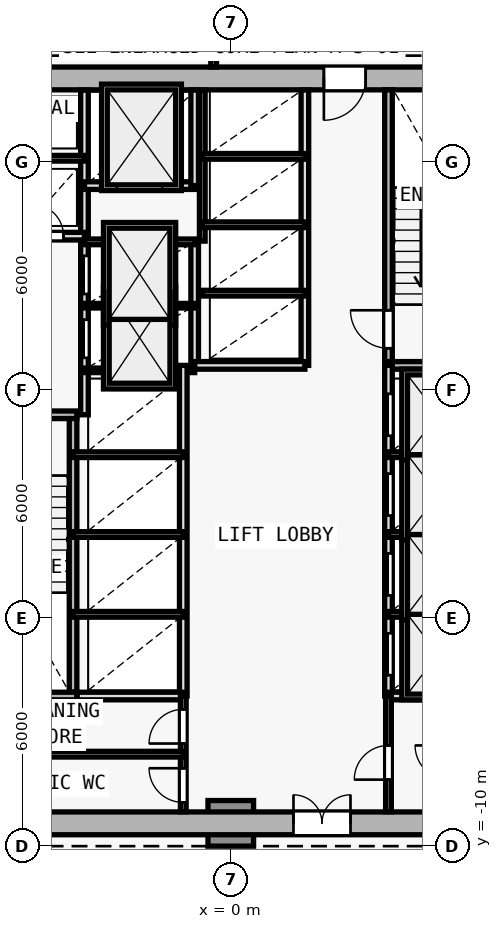
"""IFC4 building model, lengths in metres.
Left out: names, types, materials, properties, quantities, classifications, styles, units other than length and angle.
Written with IfcOpenShell. Run it as: python <this file> out.ifc"""

import sys

from ifc_helpers import new_model, si_unit, direction, frame, frame_2d, origin, origin_2d, place, context, subcontext, project, spatial, rectangle, extrude, element, fill, save


model = new_model("IFC4")
c1 = context("Model", 3, precision=1e-05, world=origin(), true_north=direction((0.0, 1.0)))
c2 = subcontext(c1, "Body", "Model", "MODEL_VIEW")
j1 = project(units=[si_unit("LENGTHUNIT", "METRE"), si_unit("PLANEANGLEUNIT", "RADIAN")], contexts=[c1])
p1 = place(None, origin())
s1 = spatial("IfcSite", under=j1, at=p1, CompositionType="ELEMENT")
p2 = place(p1, origin())
s2 = spatial("IfcBuilding", under=s1, at=p2, CompositionType="ELEMENT")
p3 = place(p2, frame((0.0, 0.0, 5.0)))
s3 = spatial("IfcBuildingStorey", under=s2, at=p3, CompositionType="ELEMENT", Elevation=5.0)
p4 = place(p3, frame((0.0, -9.4, 0.0), z_axis=(0.0, 0.0, 1.0), x_axis=(1.0, 0.0, 0.0)))
e1 = element("IfcColumn", 1, at=p4, inside=s3, PredefinedType="COLUMN", context=c2, shape_type="SweptSolid", body=[
    extrude(rectangle(XDim=1.2, YDim=1.2, at=origin_2d()), origin(), (0.0, 0.0, 1.0), 4.2),
])
p5 = place(p3, frame((-8.0, -9.4, 0.0), z_axis=(0.0, 0.0, 1.0), x_axis=(1.0, 0.0, 0.0)))
e2 = element("IfcWall", 2, at=p5, inside=s3, PredefinedType="SHEAR", context=c2, shape_type="SweptSolid", body=[
    extrude(rectangle(XDim=16.0, YDim=0.6, at=frame_2d((8.0, 0.0))), origin(), (0.0, 0.0, 1.0), 3.92),
])
p6 = place(p5, frame((9.65, 0.0, 0.0)))
e3 = element("IfcOpeningElement", 3, at=p6, cuts=e2, PredefinedType="OPENING", context=c2, shape_type="SweptSolid", body=[
    extrude(rectangle(XDim=1.5, YDim=2.2, at=frame_2d((0.75, 1.1))), frame((0.0, 0.31, 0.0), z_axis=(0.0, -1.0, 0.0), x_axis=(1.0, 0.0, 0.0)), (0.0, 0.0, 1.0), 0.62),
])
p7 = place(p3, frame((8.0, 10.2, 0.0), z_axis=(0.0, 0.0, 1.0), x_axis=(-1.0, 0.0, 0.0)))
e4 = element("IfcWall", 4, at=p7, inside=s3, PredefinedType="SHEAR", context=c2, shape_type="SweptSolid", body=[
    extrude(rectangle(XDim=16.0, YDim=0.6, at=frame_2d((8.0, 0.0))), origin(), (0.0, 0.0, 1.0), 3.92),
])
p8 = place(p7, frame((4.45, 0.0, 0.0)))
e5 = element("IfcOpeningElement", 5, at=p8, cuts=e4, PredefinedType="OPENING", context=c2, shape_type="SweptSolid", body=[
    extrude(rectangle(XDim=1.1, YDim=2.15, at=frame_2d((0.55, 1.075))), frame((0.0, 0.31, 0.0), z_axis=(0.0, -1.0, 0.0), x_axis=(1.0, 0.0, 0.0)), (0.0, 0.0, 1.0), 0.62),
])
p9 = place(p3, frame((-7.4, 1.35, 0.0), z_axis=(0.0, 0.0, 1.0), x_axis=(1.0, 0.0, 0.0)))
e6 = element("IfcWall", 6, at=p9, inside=s3, PredefinedType="SOLIDWALL", context=c2, shape_type="SweptSolid", body=[
    extrude(rectangle(XDim=3.35, YDim=0.2, at=frame_2d((1.675, 0.0))), origin(), (0.0, 0.0, 1.0), 3.92),
])
p10 = place(p9, frame((0.65, 0.0, 0.0)))
e7 = element("IfcOpeningElement", 7, at=p10, cuts=e6, PredefinedType="OPENING", context=c2, shape_type="SweptSolid", body=[
    extrude(rectangle(XDim=1.0, YDim=2.15, at=frame_2d((0.5, 1.075))), frame((0.0, 0.11, 0.0), z_axis=(0.0, -1.0, 0.0), x_axis=(1.0, 0.0, 0.0)), (0.0, 0.0, 1.0), 0.22),
])
p11 = place(p3, frame((-4.15, -5.95, 0.0), z_axis=(0.0, 0.0, 1.0), x_axis=(0.0, 1.0, 0.0)))
e8 = element("IfcWall", 8, at=p11, inside=s3, PredefinedType="SOLIDWALL", context=c2, shape_type="SweptSolid", body=[
    extrude(rectangle(XDim=7.2, YDim=0.2, at=frame_2d((3.6, 0.0))), origin(), (0.0, 0.0, 1.0), 3.92),
])
p12 = place(p3, frame((-3.85, 1.35, 0.0), z_axis=(0.0, 0.0, 1.0), x_axis=(0.0, 1.0, 0.0)))
e9 = element("IfcWall", 9, at=p12, inside=s3, PredefinedType="SOLIDWALL", context=c2, shape_type="SweptSolid", body=[
    extrude(rectangle(XDim=8.545, YDim=0.2, at=frame_2d((4.272, 0.0))), origin(), (0.0, 0.0, 1.0), 3.92),
])
p13 = place(p12, frame((1.5, 0.0, 0.0)))
e10 = element("IfcOpeningElement", 10, at=p13, cuts=e9, PredefinedType="OPENING", context=c2, shape_type="SweptSolid", body=[
    extrude(rectangle(XDim=1.0, YDim=2.15, at=frame_2d((0.5, 1.075))), frame((0.0, 0.11, 0.0), z_axis=(0.0, -1.0, 0.0), x_axis=(1.0, 0.0, 0.0)), (0.0, 0.0, 1.0), 0.22),
])
p14 = place(p12, frame((3.18, 0.0, 0.0)))
e11 = element("IfcOpeningElement", 11, at=p14, cuts=e9, PredefinedType="OPENING", context=c2, shape_type="SweptSolid", body=[
    extrude(rectangle(XDim=1.0, YDim=2.15, at=frame_2d((0.5, 1.075))), frame((0.0, 0.11, 0.0), z_axis=(0.0, -1.0, 0.0), x_axis=(1.0, 0.0, 0.0)), (0.0, 0.0, 1.0), 0.22),
])
p15 = place(p3, frame((-7.395, 6.05, 0.0), z_axis=(0.0, 0.0, 1.0), x_axis=(1.0, 0.0, 0.0)))
e12 = element("IfcWall", 12, at=p15, inside=s3, PredefinedType="SOLIDWALL", context=c2, shape_type="SweptSolid", body=[
    extrude(rectangle(XDim=3.545, YDim=0.2, at=frame_2d((1.772, 0.0))), origin(), (0.0, 0.0, 1.0), 3.92),
])
p16 = place(p15, frame((0.345, 0.0, 0.0)))
e13 = element("IfcOpeningElement", 13, at=p16, cuts=e12, PredefinedType="OPENING", context=c2, shape_type="SweptSolid", body=[
    extrude(rectangle(XDim=0.85, YDim=2.1, at=frame_2d((0.425, 1.05))), frame((0.0, 0.11, 0.0), z_axis=(0.0, -1.0, 0.0), x_axis=(1.0, 0.0, 0.0)), (0.0, 0.0, 1.0), 0.22),
])
p17 = place(p15, frame((2.145, 0.0, 0.0)))
e14 = element("IfcOpeningElement", 14, at=p17, cuts=e12, PredefinedType="OPENING", context=c2, shape_type="SweptSolid", body=[
    extrude(rectangle(XDim=0.85, YDim=2.1, at=frame_2d((0.425, 1.05))), frame((0.0, 0.11, 0.0), z_axis=(0.0, -1.0, 0.0), x_axis=(1.0, 0.0, 0.0)), (0.0, 0.0, 1.0), 0.22),
])
p18 = place(p3, frame((-7.395, 8.1, 0.0), z_axis=(0.0, 0.0, 1.0), x_axis=(1.0, 0.0, 0.0)))
e15 = element("IfcWall", 15, at=p18, inside=s3, PredefinedType="PARTITIONING", context=c2, shape_type="SweptSolid", body=[
    extrude(rectangle(XDim=3.545, YDim=0.15, at=frame_2d((1.772, 0.0))), origin(), (0.0, 0.0, 1.0), 3.92),
])
p19 = place(p3, frame((4.15, 2.75, 0.0), z_axis=(0.0, 0.0, 1.0), x_axis=(0.0, 1.0, 0.0)))
e16 = element("IfcWall", 16, at=p19, inside=s3, PredefinedType="SOLIDWALL", context=c2, shape_type="SweptSolid", body=[
    extrude(rectangle(XDim=7.15, YDim=0.2, at=frame_2d((3.575, 0.0))), origin(), (0.0, 0.0, 1.0), 3.92),
])
p20 = place(p19, frame((0.35, 0.0, 0.0)))
e17 = element("IfcOpeningElement", 17, at=p20, cuts=e16, PredefinedType="OPENING", context=c2, shape_type="SweptSolid", body=[
    extrude(rectangle(XDim=1.0, YDim=2.15, at=frame_2d((0.5, 1.075))), frame((0.0, 0.11, 0.0), z_axis=(0.0, -1.0, 0.0), x_axis=(1.0, 0.0, 0.0)), (0.0, 0.0, 1.0), 0.22),
])
p21 = place(p3, frame((4.05, 2.65, 0.0), z_axis=(0.0, 0.0, 1.0), x_axis=(1.0, 0.0, 0.0)))
e18 = element("IfcWall", 18, at=p21, inside=s3, PredefinedType="SOLIDWALL", context=c2, shape_type="SweptSolid", body=[
    extrude(rectangle(XDim=3.35, YDim=0.2, at=frame_2d((1.675, 0.0))), origin(), (0.0, 0.0, 1.0), 3.92),
])
p22 = place(p3, frame((-0.95, 2.65, 0.0), z_axis=(0.0, 0.0, 1.0), x_axis=(0.0, 1.0, 0.0)))
e19 = element("IfcWall", 19, at=p22, inside=s3, PredefinedType="SOLIDWALL", context=c2, shape_type="SweptSolid", body=[
    extrude(rectangle(XDim=3.27, YDim=0.2, at=frame_2d((1.635, 0.0))), origin(), (0.0, 0.0, 1.0), 3.92),
])
for number, where, z_axis, x_axis in (
    (20, (-3.85, 2.52, 0.0), (0.0, 0.0, 1.0), (1.0, 0.0, 0.0)),
    (21, (-3.85, 4.22, 0.0), (0.0, 0.0, 1.0), (1.0, 0.0, 0.0)),
):
    element("IfcWall", number, at=place(p3, frame(where, z_axis=z_axis, x_axis=x_axis)), inside=s3, PredefinedType="PARTITIONING", context=c2, shape_type="SweptSolid", body=[
        extrude(rectangle(XDim=2.9, YDim=0.12, at=frame_2d((1.45, 0.0))), origin(), (0.0, 0.0, 1.0), 3.92),
    ])
p23 = place(p3, frame((-3.85, 5.9, 0.0), z_axis=(0.0, 0.0, 1.0), x_axis=(1.0, 0.0, 0.0)))
e22 = element("IfcWall", 22, at=p23, inside=s3, PredefinedType="PARTITIONING", context=c2, shape_type="SweptSolid", body=[
    extrude(rectangle(XDim=2.9, YDim=0.15, at=frame_2d((1.45, 0.0))), origin(), (0.0, 0.0, 1.0), 3.92),
])
p24 = place(p3, frame((-3.85, 7.38, 0.0), z_axis=(0.0, 0.0, 1.0), x_axis=(1.0, 0.0, 0.0)))
e23 = element("IfcWall", 23, at=p24, inside=s3, PredefinedType="SOLIDWALL", context=c2, shape_type="SweptSolid", body=[
    extrude(rectangle(XDim=2.9, YDim=0.2, at=frame_2d((1.45, 0.0))), origin(), (0.0, 0.0, 1.0), 3.92),
])
p25 = place(p24, frame((0.85, 0.0, 0.0)))
e24 = element("IfcOpeningElement", 24, at=p25, cuts=e23, PredefinedType="OPENING", context=c2, shape_type="SweptSolid", body=[
    extrude(rectangle(XDim=1.2, YDim=2.2, at=frame_2d((0.6, 1.1))), frame((0.0, 0.11, 0.0), z_axis=(0.0, -1.0, 0.0), x_axis=(1.0, 0.0, 0.0)), (0.0, 0.0, 1.0), 0.22),
])
p26 = place(p3, frame((-0.95, 7.38, 0.0), z_axis=(0.0, 0.0, 1.0), x_axis=(0.0, 1.0, 0.0)))
e25 = element("IfcWall", 25, at=p26, inside=s3, PredefinedType="SOLIDWALL", context=c2, shape_type="SweptSolid", body=[
    extrude(rectangle(XDim=2.515, YDim=0.2, at=frame_2d((1.258, 0.0))), origin(), (0.0, 0.0, 1.0), 3.92),
])
p27 = place(p3, frame((4.15, -6.05, 0.0), z_axis=(0.0, 0.0, 1.0), x_axis=(0.0, 1.0, 0.0)))
e26 = element("IfcWall", 26, at=p27, inside=s3, PredefinedType="SOLIDWALL", context=c2, shape_type="SweptSolid", body=[
    extrude(rectangle(XDim=8.7, YDim=0.2, at=frame_2d((4.35, 0.0))), origin(), (0.0, 0.0, 1.0), 3.92),
])
p28 = place(p27, frame((0.55, 0.0, 0.0)))
e27 = element("IfcOpeningElement", 27, at=p28, cuts=e26, PredefinedType="OPENING", context=c2, shape_type="SweptSolid", body=[
    extrude(rectangle(XDim=1.1, YDim=2.15, at=frame_2d((0.55, 1.075))), frame((0.0, 0.11, 0.0), z_axis=(0.0, -1.0, 0.0), x_axis=(1.0, 0.0, 0.0)), (0.0, 0.0, 1.0), 0.22),
])
p29 = place(p27, frame((2.65, 0.0, 0.0)))
e28 = element("IfcOpeningElement", 28, at=p29, cuts=e26, PredefinedType="OPENING", context=c2, shape_type="SweptSolid", body=[
    extrude(rectangle(XDim=1.1, YDim=2.15, at=frame_2d((0.55, 1.075))), frame((0.0, 0.11, 0.0), z_axis=(0.0, -1.0, 0.0), x_axis=(1.0, 0.0, 0.0)), (0.0, 0.0, 1.0), 0.22),
])
p30 = place(p27, frame((4.75, 0.0, 0.0)))
e29 = element("IfcOpeningElement", 29, at=p30, cuts=e26, PredefinedType="OPENING", context=c2, shape_type="SweptSolid", body=[
    extrude(rectangle(XDim=1.1, YDim=2.15, at=frame_2d((0.55, 1.075))), frame((0.0, 0.11, 0.0), z_axis=(0.0, -1.0, 0.0), x_axis=(1.0, 0.0, 0.0)), (0.0, 0.0, 1.0), 0.22),
])
p31 = place(p27, frame((6.85, 0.0, 0.0)))
e30 = element("IfcOpeningElement", 30, at=p31, cuts=e26, PredefinedType="OPENING", context=c2, shape_type="SweptSolid", body=[
    extrude(rectangle(XDim=1.1, YDim=2.15, at=frame_2d((0.55, 1.075))), frame((0.0, 0.11, 0.0), z_axis=(0.0, -1.0, 0.0), x_axis=(1.0, 0.0, 0.0)), (0.0, 0.0, 1.0), 0.22),
])
for number, where, z_axis, x_axis in (
    (31, (4.15, -3.9, 0.0), (0.0, 0.0, 1.0), (1.0, 0.0, 0.0)),
    (32, (4.15, -1.8, 0.0), (0.0, 0.0, 1.0), (1.0, 0.0, 0.0)),
    (33, (4.15, 0.3, 0.0), (0.0, 0.0, 1.0), (1.0, 0.0, 0.0)),
):
    element("IfcWall", number, at=place(p3, frame(where, z_axis=z_axis, x_axis=x_axis)), inside=s3, PredefinedType="PARTITIONING", context=c2, shape_type="SweptSolid", body=[
        extrude(rectangle(XDim=2.6, YDim=0.15, at=frame_2d((1.3, 0.0))), origin(), (0.0, 0.0, 1.0), 3.92),
    ])
p32 = place(p3, frame((-1.25, -6.05, 0.0), z_axis=(0.0, 0.0, 1.0), x_axis=(0.0, 1.0, 0.0)))
e34 = element("IfcWall", 34, at=p32, inside=s3, PredefinedType="SOLIDWALL", context=c2, shape_type="SweptSolid", body=[
    extrude(rectangle(XDim=8.7, YDim=0.2, at=frame_2d((4.35, 0.0))), origin(), (0.0, 0.0, 1.0), 3.92),
])
for number, where, z_axis, x_axis in (
    (35, (-4.15, -3.9, 0.0), (0.0, 0.0, 1.0), (1.0, 0.0, 0.0)),
    (36, (-4.15, -1.8, 0.0), (0.0, 0.0, 1.0), (1.0, 0.0, 0.0)),
    (37, (-4.15, 0.3, 0.0), (0.0, 0.0, 1.0), (1.0, 0.0, 0.0)),
):
    element("IfcWall", number, at=place(p3, frame(where, z_axis=z_axis, x_axis=x_axis)), inside=s3, PredefinedType="PARTITIONING", context=c2, shape_type="SweptSolid", body=[
        extrude(rectangle(XDim=2.9, YDim=0.15, at=frame_2d((1.45, 0.0))), origin(), (0.0, 0.0, 1.0), 3.92),
    ])
p33 = place(p3, frame((1.95, 2.65, 0.0), z_axis=(0.0, 0.0, 1.0), x_axis=(0.0, 1.0, 0.0)))
e38 = element("IfcWall", 38, at=p33, inside=s3, PredefinedType="SOLIDWALL", context=c2, shape_type="SweptSolid", body=[
    extrude(rectangle(XDim=7.245, YDim=0.2, at=frame_2d((3.623, 0.0))), origin(), (0.0, 0.0, 1.0), 3.92),
])
p34 = place(p3, frame((-0.95, 2.65, 0.0), z_axis=(0.0, 0.0, 1.0), x_axis=(1.0, 0.0, 0.0)))
e39 = element("IfcWall", 39, at=p34, inside=s3, PredefinedType="SOLIDWALL", context=c2, shape_type="SweptSolid", body=[
    extrude(rectangle(XDim=2.9, YDim=0.2, at=frame_2d((1.45, 0.0))), origin(), (0.0, 0.0, 1.0), 3.92),
])
p35 = place(p3, frame((-0.75, 5.92, 0.0), z_axis=(0.0, 0.0, 1.0), x_axis=(0.0, 1.0, 0.0)))
e40 = element("IfcWall", 40, at=p35, inside=s3, PredefinedType="PARTITIONING", context=c2, shape_type="SweptSolid", body=[
    extrude(rectangle(XDim=3.975, YDim=0.15, at=frame_2d((1.988, 0.0))), origin(), (0.0, 0.0, 1.0), 3.92),
])
for number, where, z_axis, x_axis in (
    (41, (-0.75, 4.55, 0.0), (0.0, 0.0, 1.0), (1.0, 0.0, 0.0)),
    (42, (-0.75, 6.35, 0.0), (0.0, 0.0, 1.0), (1.0, 0.0, 0.0)),
    (43, (-0.75, 8.15, 0.0), (0.0, 0.0, 1.0), (1.0, 0.0, 0.0)),
):
    element("IfcWall", number, at=place(p3, frame(where, z_axis=z_axis, x_axis=x_axis)), inside=s3, PredefinedType="PARTITIONING", context=c2, shape_type="SweptSolid", body=[
        extrude(rectangle(XDim=2.7, YDim=0.15, at=frame_2d((1.35, 0.0))), origin(), (0.0, 0.0, 1.0), 3.92),
    ])
p36 = place(p3, frame((-7.4, -6.05, 0.0), z_axis=(0.0, 0.0, 1.0), x_axis=(1.0, 0.0, 0.0)))
e44 = element("IfcWall", 44, at=p36, inside=s3, PredefinedType="SOLIDWALL", context=c2, shape_type="SweptSolid", body=[
    extrude(rectangle(XDim=3.35, YDim=0.2, at=frame_2d((1.675, 0.0))), origin(), (0.0, 0.0, 1.0), 3.92),
])
p37 = place(p3, frame((-4.04, -6.05, 0.0), z_axis=(0.0, 0.0, 1.0), x_axis=(1.0, 0.0, 0.0)))
e45 = element("IfcWall", 45, at=p37, inside=s3, PredefinedType="SOLIDWALL", context=c2, shape_type="SweptSolid", body=[
    extrude(rectangle(XDim=2.79, YDim=0.2, at=frame_2d((1.395, 0.0))), origin(), (0.0, 0.0, 1.0), 3.92),
])
p38 = place(p3, frame((4.15, -6.05, 0.0), z_axis=(0.0, 0.0, 1.0), x_axis=(1.0, 0.0, 0.0)))
e46 = element("IfcWall", 46, at=p38, inside=s3, PredefinedType="SOLIDWALL", context=c2, shape_type="SweptSolid", body=[
    extrude(rectangle(XDim=3.245, YDim=0.2, at=frame_2d((1.623, 0.0))), origin(), (0.0, 0.0, 1.0), 3.92),
])
p39 = place(p3, frame((-1.25, -9.095, 0.0), z_axis=(0.0, 0.0, 1.0), x_axis=(0.0, 1.0, 0.0)))
e47 = element("IfcWall", 47, at=p39, inside=s3, PredefinedType="PARTITIONING", context=c2, shape_type="SweptSolid", body=[
    extrude(rectangle(XDim=3.045, YDim=0.15, at=frame_2d((1.522, 0.0))), origin(), (0.0, 0.0, 1.0), 3.92),
])
p40 = place(p39, frame((1.795, 0.0, 0.0)))
e48 = element("IfcOpeningElement", 48, at=p40, cuts=e47, PredefinedType="OPENING", context=c2, shape_type="SweptSolid", body=[
    extrude(rectangle(XDim=0.9, YDim=2.1, at=frame_2d((0.45, 1.05))), frame((0.0, 0.085, 0.0), z_axis=(0.0, -1.0, 0.0), x_axis=(1.0, 0.0, 0.0)), (0.0, 0.0, 1.0), 0.17),
])
p41 = place(p39, frame((0.245, 0.0, 0.0)))
e49 = element("IfcOpeningElement", 49, at=p41, cuts=e47, PredefinedType="OPENING", context=c2, shape_type="SweptSolid", body=[
    extrude(rectangle(XDim=0.9, YDim=2.1, at=frame_2d((0.45, 1.05))), frame((0.0, 0.085, 0.0), z_axis=(0.0, -1.0, 0.0), x_axis=(1.0, 0.0, 0.0)), (0.0, 0.0, 1.0), 0.17),
])
p42 = place(p3, frame((4.15, -9.095, 0.0), z_axis=(0.0, 0.0, 1.0), x_axis=(0.0, 1.0, 0.0)))
e50 = element("IfcWall", 50, at=p42, inside=s3, PredefinedType="PARTITIONING", context=c2, shape_type="SweptSolid", body=[
    extrude(rectangle(XDim=3.045, YDim=0.15, at=frame_2d((1.522, 0.0))), origin(), (0.0, 0.0, 1.0), 3.92),
])
p43 = place(p42, frame((0.845, 0.0, 0.0)))
e51 = element("IfcOpeningElement", 51, at=p43, cuts=e50, PredefinedType="OPENING", context=c2, shape_type="SweptSolid", body=[
    extrude(rectangle(XDim=0.9, YDim=2.1, at=frame_2d((0.45, 1.05))), frame((0.0, 0.085, 0.0), z_axis=(0.0, -1.0, 0.0), x_axis=(1.0, 0.0, 0.0)), (0.0, 0.0, 1.0), 0.17),
])
p44 = place(p3, frame((-7.395, -7.58, 0.0), z_axis=(0.0, 0.0, 1.0), x_axis=(1.0, 0.0, 0.0)))
e52 = element("IfcWall", 52, at=p44, inside=s3, PredefinedType="PARTITIONING", context=c2, shape_type="SweptSolid", body=[
    extrude(rectangle(XDim=6.145, YDim=0.15, at=frame_2d((3.073, 0.0))), origin(), (0.0, 0.0, 1.0), 3.92),
])
p45 = place(p3, frame((-0.45, 10.5, 0.0), z_axis=(0.0, 0.0, 1.0), x_axis=(0.0, 1.0, 0.0)))
e53 = element("IfcWall", 53, at=p45, inside=s3, PredefinedType="PARTITIONING", context=c2, shape_type="SweptSolid", body=[
    extrude(rectangle(XDim=4.75, YDim=0.15, at=frame_2d((2.375, 0.0))), origin(), (0.0, 0.0, 1.0), 3.92),
])
p46 = place(p6, origin())
e54 = element("IfcDoor", 54, at=p46, inside=s3, OperationType="DOUBLE_DOOR_SINGLE_SWING", PredefinedType="DOOR", context=c2, shape_type="SweptSolid", body=[
    extrude(rectangle(XDim=1.5, YDim=2.2, at=frame_2d((0.75, 1.1))), frame((0.0, 0.025, 0.0), z_axis=(0.0, -1.0, 0.0), x_axis=(1.0, 0.0, 0.0)), (0.0, 0.0, 1.0), 0.05),
])
fill(e3, e54)
p47 = place(p8, origin())
e55 = element("IfcDoor", 55, at=p47, inside=s3, OperationType="SINGLE_SWING_RIGHT", PredefinedType="DOOR", context=c2, shape_type="SweptSolid", body=[
    extrude(rectangle(XDim=1.1, YDim=2.15, at=frame_2d((0.55, 1.075))), frame((0.0, 0.025, 0.0), z_axis=(0.0, -1.0, 0.0), x_axis=(1.0, 0.0, 0.0)), (0.0, 0.0, 1.0), 0.05),
])
fill(e5, e55)
p48 = place(p17, origin())
e56 = element("IfcDoor", 56, at=p48, inside=s3, OperationType="SINGLE_SWING_LEFT", PredefinedType="DOOR", context=c2, shape_type="SweptSolid", body=[
    extrude(rectangle(XDim=0.85, YDim=2.1, at=frame_2d((0.425, 1.05))), frame((0.0, 0.025, 0.0), z_axis=(0.0, -1.0, 0.0), x_axis=(1.0, 0.0, 0.0)), (0.0, 0.0, 1.0), 0.05),
])
fill(e14, e56)
p49 = place(p20, origin())
e57 = element("IfcDoor", 57, at=p49, inside=s3, OperationType="SINGLE_SWING_RIGHT", PredefinedType="DOOR", context=c2, shape_type="SweptSolid", body=[
    extrude(rectangle(XDim=1.0, YDim=2.15, at=frame_2d((0.5, 1.075))), frame((0.0, 0.025, 0.0), z_axis=(0.0, -1.0, 0.0), x_axis=(1.0, 0.0, 0.0)), (0.0, 0.0, 1.0), 0.05),
])
fill(e17, e57)
p50 = place(p25, origin())
e58 = element("IfcDoor", 58, at=p50, inside=s3, OperationType="DOUBLE_DOOR_SLIDING", PredefinedType="DOOR", context=c2, shape_type="SweptSolid", body=[
    extrude(rectangle(XDim=1.2, YDim=2.2, at=frame_2d((0.6, 1.1))), frame((0.0, 0.025, 0.0), z_axis=(0.0, -1.0, 0.0), x_axis=(1.0, 0.0, 0.0)), (0.0, 0.0, 1.0), 0.05),
])
fill(e24, e58)
p51 = place(p28, origin())
e59 = element("IfcDoor", 59, at=p51, inside=s3, OperationType="DOUBLE_DOOR_SLIDING", PredefinedType="DOOR", context=c2, shape_type="SweptSolid", body=[
    extrude(rectangle(XDim=1.1, YDim=2.15, at=frame_2d((0.55, 1.075))), frame((0.0, 0.025, 0.0), z_axis=(0.0, -1.0, 0.0), x_axis=(1.0, 0.0, 0.0)), (0.0, 0.0, 1.0), 0.05),
])
fill(e27, e59)
p52 = place(p29, origin())
e60 = element("IfcDoor", 60, at=p52, inside=s3, OperationType="DOUBLE_DOOR_SLIDING", PredefinedType="DOOR", context=c2, shape_type="SweptSolid", body=[
    extrude(rectangle(XDim=1.1, YDim=2.15, at=frame_2d((0.55, 1.075))), frame((0.0, 0.025, 0.0), z_axis=(0.0, -1.0, 0.0), x_axis=(1.0, 0.0, 0.0)), (0.0, 0.0, 1.0), 0.05),
])
fill(e28, e60)
p53 = place(p30, origin())
e61 = element("IfcDoor", 61, at=p53, inside=s3, OperationType="DOUBLE_DOOR_SLIDING", PredefinedType="DOOR", context=c2, shape_type="SweptSolid", body=[
    extrude(rectangle(XDim=1.1, YDim=2.15, at=frame_2d((0.55, 1.075))), frame((0.0, 0.025, 0.0), z_axis=(0.0, -1.0, 0.0), x_axis=(1.0, 0.0, 0.0)), (0.0, 0.0, 1.0), 0.05),
])
fill(e29, e61)
p54 = place(p31, origin())
e62 = element("IfcDoor", 62, at=p54, inside=s3, OperationType="DOUBLE_DOOR_SLIDING", PredefinedType="DOOR", context=c2, shape_type="SweptSolid", body=[
    extrude(rectangle(XDim=1.1, YDim=2.15, at=frame_2d((0.55, 1.075))), frame((0.0, 0.025, 0.0), z_axis=(0.0, -1.0, 0.0), x_axis=(1.0, 0.0, 0.0)), (0.0, 0.0, 1.0), 0.05),
])
fill(e30, e62)
p55 = place(p13, origin())
e63 = element("IfcDoor", 63, at=p55, inside=s3, OperationType="DOUBLE_DOOR_SLIDING", PredefinedType="DOOR", context=c2, shape_type="SweptSolid", body=[
    extrude(rectangle(XDim=1.0, YDim=2.15, at=frame_2d((0.5, 1.075))), frame((0.0, 0.025, 0.0), z_axis=(0.0, -1.0, 0.0), x_axis=(1.0, 0.0, 0.0)), (0.0, 0.0, 1.0), 0.05),
])
fill(e10, e63)
p56 = place(p14, origin())
e64 = element("IfcDoor", 64, at=p56, inside=s3, OperationType="DOUBLE_DOOR_SLIDING", PredefinedType="DOOR", context=c2, shape_type="SweptSolid", body=[
    extrude(rectangle(XDim=1.0, YDim=2.15, at=frame_2d((0.5, 1.075))), frame((0.0, 0.025, 0.0), z_axis=(0.0, -1.0, 0.0), x_axis=(1.0, 0.0, 0.0)), (0.0, 0.0, 1.0), 0.05),
])
fill(e11, e64)
p57 = place(p40, origin())
e65 = element("IfcDoor", 65, at=p57, inside=s3, OperationType="SINGLE_SWING_LEFT", PredefinedType="DOOR", context=c2, shape_type="SweptSolid", body=[
    extrude(rectangle(XDim=0.9, YDim=2.1, at=frame_2d((0.45, 1.05))), frame((0.0, 0.025, 0.0), z_axis=(0.0, -1.0, 0.0), x_axis=(1.0, 0.0, 0.0)), (0.0, 0.0, 1.0), 0.05),
])
fill(e48, e65)
p58 = place(p41, origin())
e66 = element("IfcDoor", 66, at=p58, inside=s3, OperationType="SINGLE_SWING_RIGHT", PredefinedType="DOOR", context=c2, shape_type="SweptSolid", body=[
    extrude(rectangle(XDim=0.9, YDim=2.1, at=frame_2d((0.45, 1.05))), frame((0.0, 0.025, 0.0), z_axis=(0.0, -1.0, 0.0), x_axis=(1.0, 0.0, 0.0)), (0.0, 0.0, 1.0), 0.05),
])
fill(e49, e66)
p59 = place(p43, origin())
e67 = element("IfcDoor", 67, at=p59, inside=s3, OperationType="SINGLE_SWING_LEFT", PredefinedType="DOOR", context=c2, shape_type="SweptSolid", body=[
    extrude(rectangle(XDim=0.9, YDim=2.1, at=frame_2d((0.45, 1.05))), frame((0.0, 0.025, 0.0), z_axis=(0.0, -1.0, 0.0), x_axis=(1.0, 0.0, 0.0)), (0.0, 0.0, 1.0), 0.05),
])
fill(e51, e67)
save(model, sys.argv[1])
